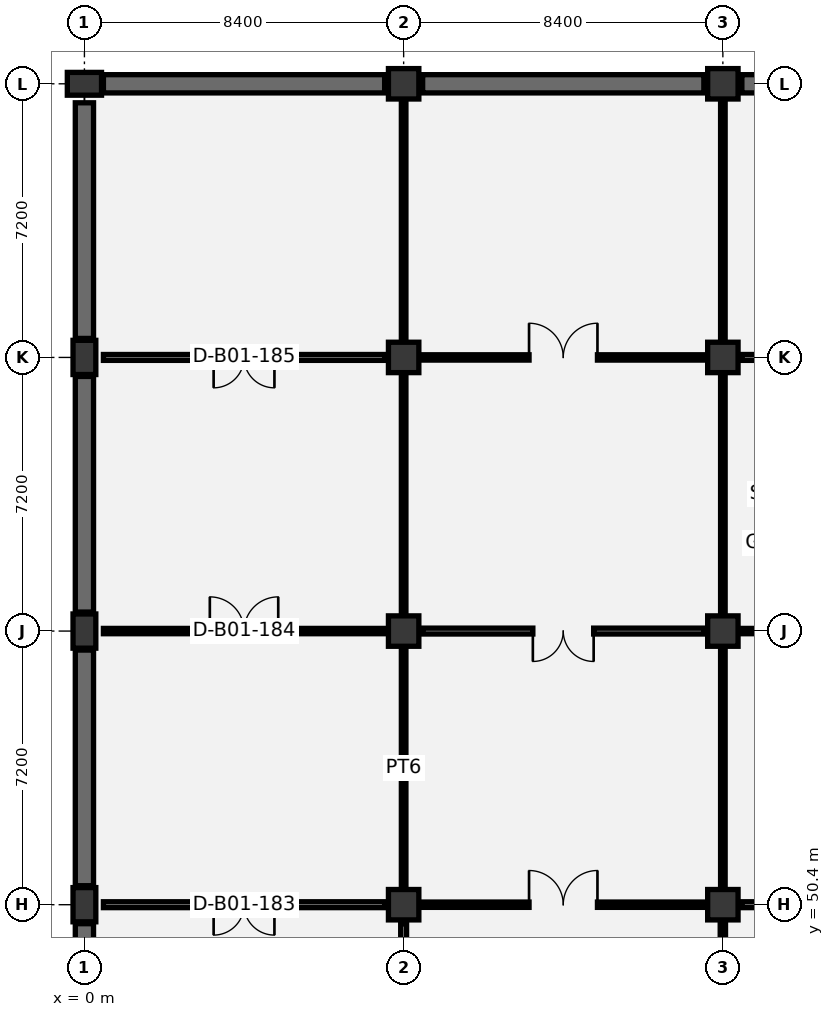
"""IFC4 building model, lengths in metres.
Left out: names, types, materials, properties, quantities, classifications, styles, units other than length and angle.
Written with IfcOpenShell. Run it as: python <this file> out.ifc"""

import sys

from ifc_helpers import new_model, si_unit, direction, frame, frame_2d, origin, origin_2d, place, context, subcontext, project, spatial, rectangle, extrude, element, fill, save


model = new_model("IFC4")
c1 = context("Model", 3, precision=1e-05, world=origin(), true_north=direction((0.0, 1.0)))
c2 = subcontext(c1, "Body", "Model", "MODEL_VIEW")
j1 = project(units=[si_unit("LENGTHUNIT", "METRE"), si_unit("PLANEANGLEUNIT", "RADIAN")], contexts=[c1])
p1 = place(None, origin())
s1 = spatial("IfcSite", under=j1, at=p1, CompositionType="ELEMENT")
p2 = place(p1, origin())
s2 = spatial("IfcBuilding", under=s1, at=p2, CompositionType="ELEMENT")
p3 = place(p2, frame((0.0, 0.0, -4.8)))
s3 = spatial("IfcBuildingStorey", under=s2, at=p3, CompositionType="ELEMENT", Elevation=-4.8)
for number, where, z_axis, x_axis in (
    (1, (0.0, 50.4, 0.0), (0.0, 0.0, 1.0), (1.0, 0.0, 0.0)),
    (2, (0.0, 57.6, 0.0), (0.0, 0.0, 1.0), (1.0, 0.0, 0.0)),
    (3, (0.0, 64.8, 0.0), (0.0, 0.0, 1.0), (1.0, 0.0, 0.0)),
    (4, (0.0, 72.0, 0.0), (0.0, 0.0, 1.0), (0.0, 1.0, 0.0)),
):
    element("IfcColumn", number, at=place(p3, frame(where, z_axis=z_axis, x_axis=x_axis)), inside=s3, PredefinedType="COLUMN", context=c2, shape_type="SweptSolid", body=[
        extrude(rectangle(XDim=0.6, YDim=0.9, at=origin_2d()), origin(), (0.0, 0.0, 1.0), 4.8),
    ])
for number, where, z_axis, x_axis in (
    (5, (8.4, 50.4, 0.0), (0.0, 0.0, 1.0), (1.0, 0.0, 0.0)),
    (6, (8.4, 57.6, 0.0), (0.0, 0.0, 1.0), (1.0, 0.0, 0.0)),
    (7, (8.4, 64.8, 0.0), (0.0, 0.0, 1.0), (1.0, 0.0, 0.0)),
    (8, (8.4, 72.0, 0.0), (0.0, 0.0, 1.0), (1.0, 0.0, 0.0)),
    (9, (16.8, 50.4, 0.0), (0.0, 0.0, 1.0), (1.0, 0.0, 0.0)),
    (10, (16.8, 57.6, 0.0), (0.0, 0.0, 1.0), (1.0, 0.0, 0.0)),
    (11, (16.8, 64.8, 0.0), (0.0, 0.0, 1.0), (1.0, 0.0, 0.0)),
    (12, (16.8, 72.0, 0.0), (0.0, 0.0, 1.0), (1.0, 0.0, 0.0)),
):
    element("IfcColumn", number, at=place(p3, frame(where, z_axis=z_axis, x_axis=x_axis)), inside=s3, PredefinedType="COLUMN", context=c2, shape_type="SweptSolid", body=[
        extrude(rectangle(XDim=0.8, YDim=0.8, at=origin_2d()), origin(), (0.0, 0.0, 1.0), 4.8),
    ])
p4 = place(p3, frame((0.0, 43.7, 0.0), z_axis=(0.0, 0.0, 1.0), x_axis=(0.0, 1.0, 0.0)))
e13 = element("IfcWall", 13, at=p4, inside=s3, PredefinedType="USERDEFINED", context=c2, shape_type="SweptSolid", body=[
    extrude(rectangle(XDim=6.2, YDim=0.48, at=frame_2d((3.1, 0.0))), origin(), (0.0, 0.0, 1.0), 4.45),
])
p5 = place(p3, frame((0.0, 50.9, 0.0), z_axis=(0.0, 0.0, 1.0), x_axis=(0.0, 1.0, 0.0)))
e14 = element("IfcWall", 14, at=p5, inside=s3, PredefinedType="USERDEFINED", context=c2, shape_type="SweptSolid", body=[
    extrude(rectangle(XDim=6.2, YDim=0.48, at=frame_2d((3.1, 0.0))), origin(), (0.0, 0.0, 1.0), 4.45),
])
p6 = place(p3, frame((0.0, 58.1, 0.0), z_axis=(0.0, 0.0, 1.0), x_axis=(0.0, 1.0, 0.0)))
e15 = element("IfcWall", 15, at=p6, inside=s3, PredefinedType="USERDEFINED", context=c2, shape_type="SweptSolid", body=[
    extrude(rectangle(XDim=6.2, YDim=0.48, at=frame_2d((3.1, 0.0))), origin(), (0.0, 0.0, 1.0), 4.45),
])
p7 = place(p3, frame((0.5, 72.0, 0.0), z_axis=(0.0, 0.0, 1.0), x_axis=(1.0, 0.0, 0.0)))
e16 = element("IfcWall", 16, at=p7, inside=s3, PredefinedType="USERDEFINED", context=c2, shape_type="SweptSolid", body=[
    extrude(rectangle(XDim=7.4, YDim=0.48, at=frame_2d((3.7, 0.0))), origin(), (0.0, 0.0, 1.0), 4.45),
])
p8 = place(p3, frame((0.0, 65.3, 0.0), z_axis=(0.0, 0.0, 1.0), x_axis=(0.0, 1.0, 0.0)))
e17 = element("IfcWall", 17, at=p8, inside=s3, PredefinedType="USERDEFINED", context=c2, shape_type="SweptSolid", body=[
    extrude(rectangle(XDim=6.2, YDim=0.48, at=frame_2d((3.1, 0.0))), origin(), (0.0, 0.0, 1.0), 4.45),
])
p9 = place(p3, frame((8.9, 72.0, 0.0), z_axis=(0.0, 0.0, 1.0), x_axis=(1.0, 0.0, 0.0)))
e18 = element("IfcWall", 18, at=p9, inside=s3, PredefinedType="USERDEFINED", context=c2, shape_type="SweptSolid", body=[
    extrude(rectangle(XDim=7.4, YDim=0.48, at=frame_2d((3.7, 0.0))), origin(), (0.0, 0.0, 1.0), 4.45),
])
p10 = place(p3, frame((17.3, 72.0, 0.0), z_axis=(0.0, 0.0, 1.0), x_axis=(1.0, 0.0, 0.0)))
e19 = element("IfcWall", 19, at=p10, inside=s3, PredefinedType="USERDEFINED", context=c2, shape_type="SweptSolid", body=[
    extrude(rectangle(XDim=7.4, YDim=0.48, at=frame_2d((3.7, 0.0))), origin(), (0.0, 0.0, 1.0), 4.45),
])
p11 = place(p3, frame((8.4, 43.7, 0.0), z_axis=(0.0, 0.0, 1.0), x_axis=(0.0, 1.0, 0.0)))
e20 = element("IfcWall", 20, at=p11, inside=s3, PredefinedType="PARTITIONING", context=c2, shape_type="SweptSolid", body=[
    extrude(rectangle(XDim=6.2, YDim=0.155, at=frame_2d((3.1, 0.0))), origin(), (0.0, 0.0, 1.0), 3.645),
])
p12 = place(p11, frame((2.2, 0.0, 0.0)))
e21 = element("IfcOpeningElement", 21, at=p12, cuts=e20, PredefinedType="OPENING", context=c2, shape_type="SweptSolid", body=[
    extrude(rectangle(XDim=1.8, YDim=2.25, at=frame_2d((0.9, 1.125))), frame((0.0, 0.087, 0.0), z_axis=(0.0, -1.0, 0.0), x_axis=(1.0, 0.0, 0.0)), (0.0, 0.0, 1.0), 0.175),
])
p13 = place(p3, frame((0.5, 50.4, 0.0), z_axis=(0.0, 0.0, 1.0), x_axis=(1.0, 0.0, 0.0)))
e22 = element("IfcWall", 22, at=p13, inside=s3, PredefinedType="PARTITIONING", context=c2, shape_type="SweptSolid", body=[
    extrude(rectangle(XDim=7.4, YDim=0.155, at=frame_2d((3.7, 0.0))), origin(), (0.0, 0.0, 1.0), 3.545),
])
p14 = place(p13, frame((2.9, 0.0, 0.0)))
e23 = element("IfcOpeningElement", 23, at=p14, cuts=e22, PredefinedType="OPENING", context=c2, shape_type="SweptSolid", body=[
    extrude(rectangle(XDim=1.6, YDim=2.2, at=frame_2d((0.8, 1.1))), frame((0.0, 0.087, 0.0), z_axis=(0.0, -1.0, 0.0), x_axis=(1.0, 0.0, 0.0)), (0.0, 0.0, 1.0), 0.175),
])
p15 = place(p3, frame((8.4, 50.9, 0.0), z_axis=(0.0, 0.0, 1.0), x_axis=(0.0, 1.0, 0.0)))
e24 = element("IfcWall", 24, at=p15, inside=s3, PredefinedType="PARTITIONING", context=c2, shape_type="SweptSolid", body=[
    extrude(rectangle(XDim=6.2, YDim=0.12, at=frame_2d((3.1, 0.0))), origin(), (0.0, 0.0, 1.0), 3.645),
])
p16 = place(p3, frame((0.5, 57.6, 0.0), z_axis=(0.0, 0.0, 1.0), x_axis=(1.0, 0.0, 0.0)))
e25 = element("IfcWall", 25, at=p16, inside=s3, PredefinedType="PARTITIONING", context=c2, shape_type="SweptSolid", body=[
    extrude(rectangle(XDim=7.4, YDim=0.14, at=frame_2d((3.7, 0.0))), origin(), (0.0, 0.0, 1.0), 3.545),
])
p17 = place(p16, frame((2.8, 0.0, 0.0)))
e26 = element("IfcOpeningElement", 26, at=p17, cuts=e25, PredefinedType="OPENING", context=c2, shape_type="SweptSolid", body=[
    extrude(rectangle(XDim=1.8, YDim=2.25, at=frame_2d((0.9, 1.125))), frame((0.0, 0.08, 0.0), z_axis=(0.0, -1.0, 0.0), x_axis=(1.0, 0.0, 0.0)), (0.0, 0.0, 1.0), 0.16),
])
p18 = place(p3, frame((8.4, 58.1, 0.0), z_axis=(0.0, 0.0, 1.0), x_axis=(0.0, 1.0, 0.0)))
e27 = element("IfcWall", 27, at=p18, inside=s3, PredefinedType="PARTITIONING", context=c2, shape_type="SweptSolid", body=[
    extrude(rectangle(XDim=6.2, YDim=0.12, at=frame_2d((3.1, 0.0))), origin(), (0.0, 0.0, 1.0), 3.645),
])
p19 = place(p3, frame((0.5, 64.8, 0.0), z_axis=(0.0, 0.0, 1.0), x_axis=(1.0, 0.0, 0.0)))
e28 = element("IfcWall", 28, at=p19, inside=s3, PredefinedType="PARTITIONING", context=c2, shape_type="SweptSolid", body=[
    extrude(rectangle(XDim=7.4, YDim=0.155, at=frame_2d((3.7, 0.0))), origin(), (0.0, 0.0, 1.0), 3.545),
])
p20 = place(p19, frame((2.9, 0.0, 0.0)))
e29 = element("IfcOpeningElement", 29, at=p20, cuts=e28, PredefinedType="OPENING", context=c2, shape_type="SweptSolid", body=[
    extrude(rectangle(XDim=1.6, YDim=2.2, at=frame_2d((0.8, 1.1))), frame((0.0, 0.087, 0.0), z_axis=(0.0, -1.0, 0.0), x_axis=(1.0, 0.0, 0.0)), (0.0, 0.0, 1.0), 0.175),
])
p21 = place(p3, frame((8.4, 65.3, 0.0), z_axis=(0.0, 0.0, 1.0), x_axis=(0.0, 1.0, 0.0)))
e30 = element("IfcWall", 30, at=p21, inside=s3, PredefinedType="PARTITIONING", context=c2, shape_type="SweptSolid", body=[
    extrude(rectangle(XDim=6.2, YDim=0.12, at=frame_2d((3.1, 0.0))), origin(), (0.0, 0.0, 1.0), 3.645),
])
p22 = place(p3, frame((16.8, 43.7, 0.0), z_axis=(0.0, 0.0, 1.0), x_axis=(0.0, 1.0, 0.0)))
e31 = element("IfcWall", 31, at=p22, inside=s3, PredefinedType="PARTITIONING", context=c2, shape_type="SweptSolid", body=[
    extrude(rectangle(XDim=6.2, YDim=0.14, at=frame_2d((3.1, 0.0))), origin(), (0.0, 0.0, 1.0), 3.645),
])
p23 = place(p22, frame((2.3, 0.0, 0.0)))
e32 = element("IfcOpeningElement", 32, at=p23, cuts=e31, PredefinedType="OPENING", context=c2, shape_type="SweptSolid", body=[
    extrude(rectangle(XDim=1.6, YDim=2.2, at=frame_2d((0.8, 1.1))), frame((0.0, 0.08, 0.0), z_axis=(0.0, -1.0, 0.0), x_axis=(1.0, 0.0, 0.0)), (0.0, 0.0, 1.0), 0.16),
])
p24 = place(p3, frame((8.9, 50.4, 0.0), z_axis=(0.0, 0.0, 1.0), x_axis=(1.0, 0.0, 0.0)))
e33 = element("IfcWall", 33, at=p24, inside=s3, PredefinedType="PARTITIONING", context=c2, shape_type="SweptSolid", body=[
    extrude(rectangle(XDim=7.4, YDim=0.14, at=frame_2d((3.7, 0.0))), origin(), (0.0, 0.0, 1.0), 3.545),
])
p25 = place(p24, frame((2.8, 0.0, 0.0)))
e34 = element("IfcOpeningElement", 34, at=p25, cuts=e33, PredefinedType="OPENING", context=c2, shape_type="SweptSolid", body=[
    extrude(rectangle(XDim=1.8, YDim=2.25, at=frame_2d((0.9, 1.125))), frame((0.0, 0.08, 0.0), z_axis=(0.0, -1.0, 0.0), x_axis=(1.0, 0.0, 0.0)), (0.0, 0.0, 1.0), 0.16),
])
p26 = place(p3, frame((16.8, 50.9, 0.0), z_axis=(0.0, 0.0, 1.0), x_axis=(0.0, 1.0, 0.0)))
e35 = element("IfcWall", 35, at=p26, inside=s3, PredefinedType="PARTITIONING", context=c2, shape_type="SweptSolid", body=[
    extrude(rectangle(XDim=6.2, YDim=0.12, at=frame_2d((3.1, 0.0))), origin(), (0.0, 0.0, 1.0), 3.645),
])
p27 = place(p3, frame((8.9, 57.6, 0.0), z_axis=(0.0, 0.0, 1.0), x_axis=(1.0, 0.0, 0.0)))
e36 = element("IfcWall", 36, at=p27, inside=s3, PredefinedType="PARTITIONING", context=c2, shape_type="SweptSolid", body=[
    extrude(rectangle(XDim=7.4, YDim=0.155, at=frame_2d((3.7, 0.0))), origin(), (0.0, 0.0, 1.0), 3.545),
])
p28 = place(p27, frame((2.9, 0.0, 0.0)))
e37 = element("IfcOpeningElement", 37, at=p28, cuts=e36, PredefinedType="OPENING", context=c2, shape_type="SweptSolid", body=[
    extrude(rectangle(XDim=1.6, YDim=2.2, at=frame_2d((0.8, 1.1))), frame((0.0, 0.087, 0.0), z_axis=(0.0, -1.0, 0.0), x_axis=(1.0, 0.0, 0.0)), (0.0, 0.0, 1.0), 0.175),
])
p29 = place(p3, frame((16.8, 58.1, 0.0), z_axis=(0.0, 0.0, 1.0), x_axis=(0.0, 1.0, 0.0)))
e38 = element("IfcWall", 38, at=p29, inside=s3, PredefinedType="PARTITIONING", context=c2, shape_type="SweptSolid", body=[
    extrude(rectangle(XDim=6.2, YDim=0.12, at=frame_2d((3.1, 0.0))), origin(), (0.0, 0.0, 1.0), 3.645),
])
p30 = place(p3, frame((8.9, 64.8, 0.0), z_axis=(0.0, 0.0, 1.0), x_axis=(1.0, 0.0, 0.0)))
e39 = element("IfcWall", 39, at=p30, inside=s3, PredefinedType="PARTITIONING", context=c2, shape_type="SweptSolid", body=[
    extrude(rectangle(XDim=7.4, YDim=0.14, at=frame_2d((3.7, 0.0))), origin(), (0.0, 0.0, 1.0), 3.545),
])
p31 = place(p30, frame((2.8, 0.0, 0.0)))
e40 = element("IfcOpeningElement", 40, at=p31, cuts=e39, PredefinedType="OPENING", context=c2, shape_type="SweptSolid", body=[
    extrude(rectangle(XDim=1.8, YDim=2.25, at=frame_2d((0.9, 1.125))), frame((0.0, 0.08, 0.0), z_axis=(0.0, -1.0, 0.0), x_axis=(1.0, 0.0, 0.0)), (0.0, 0.0, 1.0), 0.16),
])
p32 = place(p3, frame((16.8, 65.3, 0.0), z_axis=(0.0, 0.0, 1.0), x_axis=(0.0, 1.0, 0.0)))
e41 = element("IfcWall", 41, at=p32, inside=s3, PredefinedType="PARTITIONING", context=c2, shape_type="SweptSolid", body=[
    extrude(rectangle(XDim=6.2, YDim=0.12, at=frame_2d((3.1, 0.0))), origin(), (0.0, 0.0, 1.0), 3.645),
])
p33 = place(p3, frame((17.3, 50.4, 0.0), z_axis=(0.0, 0.0, 1.0), x_axis=(1.0, 0.0, 0.0)))
e42 = element("IfcWall", 42, at=p33, inside=s3, PredefinedType="PARTITIONING", context=c2, shape_type="SweptSolid", body=[
    extrude(rectangle(XDim=7.4, YDim=0.155, at=frame_2d((3.7, 0.0))), origin(), (0.0, 0.0, 1.0), 3.545),
])
p34 = place(p33, frame((2.9, 0.0, 0.0)))
e43 = element("IfcOpeningElement", 43, at=p34, cuts=e42, PredefinedType="OPENING", context=c2, shape_type="SweptSolid", body=[
    extrude(rectangle(XDim=1.6, YDim=2.2, at=frame_2d((0.8, 1.1))), frame((0.0, 0.087, 0.0), z_axis=(0.0, -1.0, 0.0), x_axis=(1.0, 0.0, 0.0)), (0.0, 0.0, 1.0), 0.175),
])
p35 = place(p3, frame((17.3, 57.6, 0.0), z_axis=(0.0, 0.0, 1.0), x_axis=(1.0, 0.0, 0.0)))
e44 = element("IfcWall", 44, at=p35, inside=s3, PredefinedType="PARTITIONING", context=c2, shape_type="SweptSolid", body=[
    extrude(rectangle(XDim=7.4, YDim=0.14, at=frame_2d((3.7, 0.0))), origin(), (0.0, 0.0, 1.0), 3.545),
])
p36 = place(p35, frame((2.8, 0.0, 0.0)))
e45 = element("IfcOpeningElement", 45, at=p36, cuts=e44, PredefinedType="OPENING", context=c2, shape_type="SweptSolid", body=[
    extrude(rectangle(XDim=1.8, YDim=2.25, at=frame_2d((0.9, 1.125))), frame((0.0, 0.08, 0.0), z_axis=(0.0, -1.0, 0.0), x_axis=(1.0, 0.0, 0.0)), (0.0, 0.0, 1.0), 0.16),
])
p37 = place(p3, frame((17.3, 64.8, 0.0), z_axis=(0.0, 0.0, 1.0), x_axis=(1.0, 0.0, 0.0)))
e46 = element("IfcWall", 46, at=p37, inside=s3, PredefinedType="PARTITIONING", context=c2, shape_type="SweptSolid", body=[
    extrude(rectangle(XDim=7.4, YDim=0.155, at=frame_2d((3.7, 0.0))), origin(), (0.0, 0.0, 1.0), 3.545),
])
p38 = place(p37, frame((2.9, 0.0, 0.0)))
e47 = element("IfcOpeningElement", 47, at=p38, cuts=e46, PredefinedType="OPENING", context=c2, shape_type="SweptSolid", body=[
    extrude(rectangle(XDim=1.6, YDim=2.2, at=frame_2d((0.8, 1.1))), frame((0.0, 0.087, 0.0), z_axis=(0.0, -1.0, 0.0), x_axis=(1.0, 0.0, 0.0)), (0.0, 0.0, 1.0), 0.175),
])
p39 = place(p14, frame((1.6, 0.0, 0.0), z_axis=(0.0, 0.0, 1.0), x_axis=(-1.0, 0.0, 0.0)))
e48 = element("IfcDoor", 48, at=p39, inside=s3, OperationType="DOUBLE_DOOR_SINGLE_SWING", PredefinedType="DOOR", context=c2, shape_type="SweptSolid", body=[
    extrude(rectangle(XDim=1.6, YDim=2.2, at=frame_2d((0.8, 1.1))), frame((0.0, 0.025, 0.0), z_axis=(0.0, -1.0, 0.0), x_axis=(1.0, 0.0, 0.0)), (0.0, 0.0, 1.0), 0.05),
])
fill(e23, e48)
p40 = place(p17, origin())
e49 = element("IfcDoor", 49, at=p40, inside=s3, OperationType="DOUBLE_DOOR_SINGLE_SWING", PredefinedType="DOOR", context=c2, shape_type="SweptSolid", body=[
    extrude(rectangle(XDim=1.8, YDim=2.25, at=frame_2d((0.9, 1.125))), frame((0.0, 0.025, 0.0), z_axis=(0.0, -1.0, 0.0), x_axis=(1.0, 0.0, 0.0)), (0.0, 0.0, 1.0), 0.05),
])
fill(e26, e49)
p41 = place(p20, frame((1.6, 0.0, 0.0), z_axis=(0.0, 0.0, 1.0), x_axis=(-1.0, 0.0, 0.0)))
e50 = element("IfcDoor", 50, at=p41, inside=s3, OperationType="DOUBLE_DOOR_SINGLE_SWING", PredefinedType="DOOR", context=c2, shape_type="SweptSolid", body=[
    extrude(rectangle(XDim=1.6, YDim=2.2, at=frame_2d((0.8, 1.1))), frame((0.0, 0.025, 0.0), z_axis=(0.0, -1.0, 0.0), x_axis=(1.0, 0.0, 0.0)), (0.0, 0.0, 1.0), 0.05),
])
fill(e29, e50)
p42 = place(p25, origin())
e51 = element("IfcDoor", 51, at=p42, inside=s3, OperationType="DOUBLE_DOOR_SINGLE_SWING", PredefinedType="DOOR", context=c2, shape_type="SweptSolid", body=[
    extrude(rectangle(XDim=1.8, YDim=2.25, at=frame_2d((0.9, 1.125))), frame((0.0, 0.025, 0.0), z_axis=(0.0, -1.0, 0.0), x_axis=(1.0, 0.0, 0.0)), (0.0, 0.0, 1.0), 0.05),
])
fill(e34, e51)
p43 = place(p28, frame((1.6, 0.0, 0.0), z_axis=(0.0, 0.0, 1.0), x_axis=(-1.0, 0.0, 0.0)))
e52 = element("IfcDoor", 52, at=p43, inside=s3, OperationType="DOUBLE_DOOR_SINGLE_SWING", PredefinedType="DOOR", context=c2, shape_type="SweptSolid", body=[
    extrude(rectangle(XDim=1.6, YDim=2.2, at=frame_2d((0.8, 1.1))), frame((0.0, 0.025, 0.0), z_axis=(0.0, -1.0, 0.0), x_axis=(1.0, 0.0, 0.0)), (0.0, 0.0, 1.0), 0.05),
])
fill(e37, e52)
p44 = place(p31, origin())
e53 = element("IfcDoor", 53, at=p44, inside=s3, OperationType="DOUBLE_DOOR_SINGLE_SWING", PredefinedType="DOOR", context=c2, shape_type="SweptSolid", body=[
    extrude(rectangle(XDim=1.8, YDim=2.25, at=frame_2d((0.9, 1.125))), frame((0.0, 0.025, 0.0), z_axis=(0.0, -1.0, 0.0), x_axis=(1.0, 0.0, 0.0)), (0.0, 0.0, 1.0), 0.05),
])
fill(e40, e53)
save(model, sys.argv[1])
